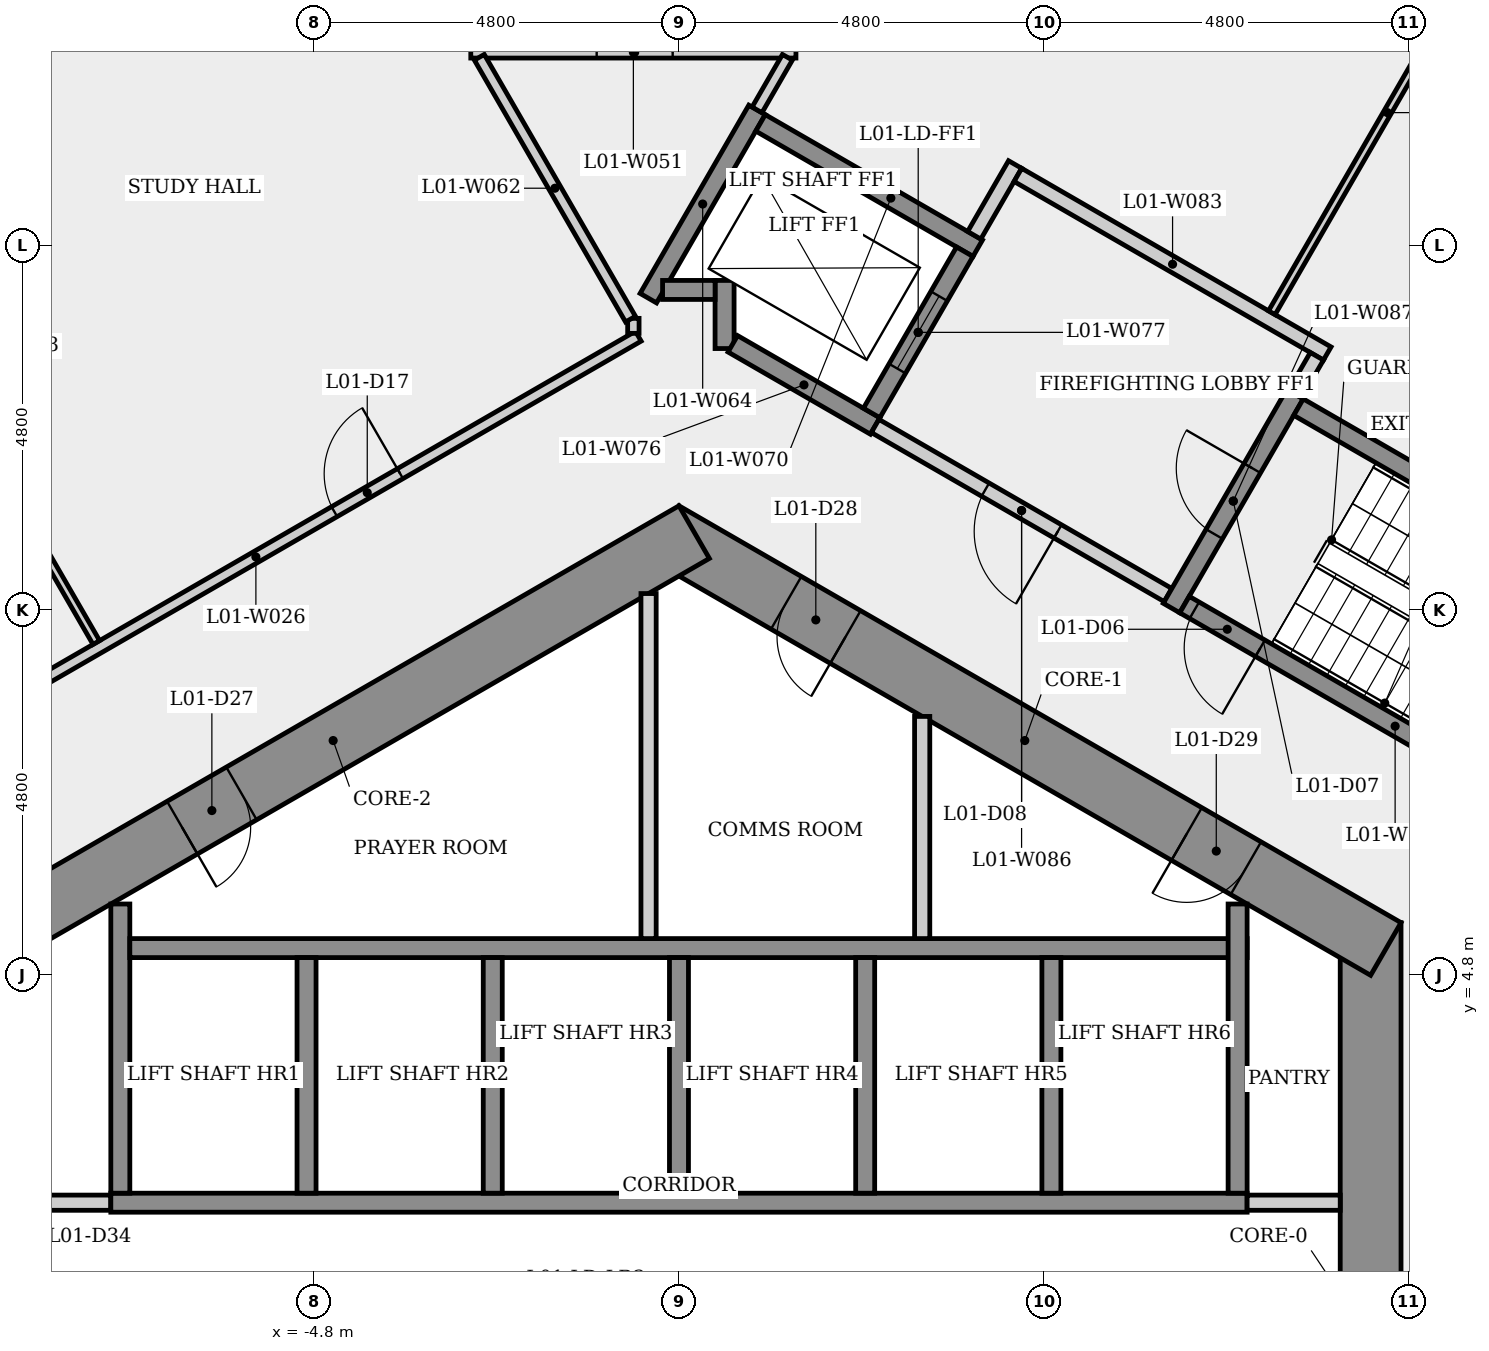
"""IFC4 building model, lengths in metres.
Left out: names, types, materials, properties, quantities, classifications, styles, units other than length and angle.
Written with IfcOpenShell. Run it as: python <this file> out.ifc"""

import sys

from ifc_helpers import new_model, si_unit, direction, frame, frame_2d, origin, place, context, subcontext, project, spatial, rectangle, extrude, element, fill, save


model = new_model("IFC4")
c1 = context("Model", 3, precision=1e-05, world=origin(), true_north=direction((0.0, 1.0)))
c2 = subcontext(c1, "Body", "Model", "MODEL_VIEW")
j1 = project(units=[si_unit("LENGTHUNIT", "METRE"), si_unit("PLANEANGLEUNIT", "RADIAN")], contexts=[c1])
p1 = place(None, origin())
s1 = spatial("IfcSite", under=j1, at=p1, CompositionType="ELEMENT")
p2 = place(p1, origin())
s2 = spatial("IfcBuilding", under=s1, at=p2, CompositionType="ELEMENT")
p3 = place(p2, frame((0.0, 0.0, 7.0)))
s3 = spatial("IfcBuildingStorey", under=s2, at=p3, CompositionType="ELEMENT", Elevation=7.0)
p4 = place(p3, frame((9.1, -5.485, 0.0), z_axis=(0.0, 0.0, 1.0), x_axis=(0.0, 1.0, 0.0)))
e1 = element("IfcWall", 1, at=p4, inside=s3, PredefinedType="SHEAR", context=c2, shape_type="SweptSolid", body=[
    extrude(rectangle(XDim=10.97, YDim=0.8, at=frame_2d((5.485, 0.0))), origin(), (0.0, 0.0, 1.0), 4.5),
])
p5 = place(p4, frame((4.685, 0.0, 0.0)))
e2 = element("IfcOpeningElement", 2, at=p5, cuts=e1, PredefinedType="OPENING", context=c2, shape_type="SweptSolid", body=[
    extrude(rectangle(XDim=1.6, YDim=2.1, at=frame_2d((0.8, 1.05))), frame((0.0, 0.41, 0.0), z_axis=(0.0, -1.0, 0.0), x_axis=(1.0, 0.0, 0.0)), (0.0, 0.0, 1.0), 0.82),
])
p6 = place(p3, frame((9.3, 5.138, 0.0), z_axis=(0.0, 0.0, 1.0), x_axis=(-0.866023993627, 0.500002442456, 0.0)))
e3 = element("IfcWall", 3, at=p6, inside=s3, PredefinedType="SHEAR", context=c2, shape_type="SweptSolid", body=[
    extrude(rectangle(XDim=10.97, YDim=0.8, at=frame_2d((5.485, 0.0))), origin(), (0.0, 0.0, 1.0), 4.5),
])
p7 = place(p6, frame((8.21, 0.0, 0.0)))
e4 = element("IfcOpeningElement", 4, at=p7, cuts=e3, PredefinedType="OPENING", context=c2, shape_type="SweptSolid", body=[
    extrude(rectangle(XDim=0.9, YDim=2.1, at=frame_2d((0.45, 1.05))), frame((0.0, 0.41, 0.0), z_axis=(0.0, -1.0, 0.0), x_axis=(1.0, 0.0, 0.0)), (0.0, 0.0, 1.0), 0.82),
])
p8 = place(p6, frame((2.126, 0.0, 0.0)))
e5 = element("IfcOpeningElement", 5, at=p8, cuts=e3, PredefinedType="OPENING", context=c2, shape_type="SweptSolid", body=[
    extrude(rectangle(XDim=0.9, YDim=2.1, at=frame_2d((0.45, 1.05))), frame((0.0, 0.41, 0.0), z_axis=(0.0, -1.0, 0.0), x_axis=(1.0, 0.0, 0.0)), (0.0, 0.0, 1.0), 0.82),
])
p9 = place(p3, frame((0.2, 10.623, 0.0), z_axis=(0.0, 0.0, 1.0), x_axis=(-0.866023993627, -0.500002442456, 0.0)))
e6 = element("IfcWall", 6, at=p9, inside=s3, PredefinedType="SHEAR", context=c2, shape_type="SweptSolid", body=[
    extrude(rectangle(XDim=10.97, YDim=0.8, at=frame_2d((5.485, 0.0))), origin(), (0.0, 0.0, 1.0), 4.5),
])
p10 = place(p9, frame((6.877, 0.0, 0.0)))
e7 = element("IfcOpeningElement", 7, at=p10, cuts=e6, PredefinedType="OPENING", context=c2, shape_type="SweptSolid", body=[
    extrude(rectangle(XDim=0.9, YDim=2.1, at=frame_2d((0.45, 1.05))), frame((0.0, 0.41, 0.0), z_axis=(0.0, -1.0, 0.0), x_axis=(1.0, 0.0, 0.0)), (0.0, 0.0, 1.0), 0.82),
])
p11 = place(p3, frame((-10.598, 7.391, 0.0), z_axis=(0.0, 0.0, 1.0), x_axis=(0.866022183431, 0.500005577774, 0.0)))
e8 = element("IfcWall", 8, at=p11, inside=s3, PredefinedType="PARTITIONING", context=c2, shape_type="SweptSolid", body=[
    extrude(rectangle(XDim=11.619, YDim=0.15, at=frame_2d((5.81, 0.0))), origin(), (0.0, 0.0, 1.0), 4.1),
])
p12 = place(p11, frame((7.001, 0.0, 0.0)))
e9 = element("IfcOpeningElement", 9, at=p12, cuts=e8, PredefinedType="OPENING", context=c2, shape_type="SweptSolid", body=[
    extrude(rectangle(XDim=1.0, YDim=2.1, at=frame_2d((0.5, 1.05))), frame((0.0, 0.085, 0.0), z_axis=(0.0, -1.0, 0.0), x_axis=(1.0, 0.0, 0.0)), (0.0, 0.0, 1.0), 0.17),
])
p13 = place(p3, frame((-8.7, 1.8, 0.0), z_axis=(0.0, 0.0, 1.0), x_axis=(1.0, 0.0, 0.0)))
e10 = element("IfcWall", 10, at=p13, inside=s3, PredefinedType="PARTITIONING", context=c2, shape_type="SweptSolid", body=[
    extrude(rectangle(XDim=1.225, YDim=0.2, at=frame_2d((0.613, 0.0))), origin(), (0.0, 0.0, 1.0), 4.1),
])
p14 = place(p3, frame((-7.666, 9.171, 0.0), z_axis=(0.0, 0.0, 1.0), x_axis=(-0.500009404554, 0.866019973994, 0.0)))
e11 = element("IfcWall", 11, at=p14, inside=s3, PredefinedType="PARTITIONING", context=c2, shape_type="SweptSolid", body=[
    extrude(rectangle(XDim=9.01, YDim=0.1, at=frame_2d((4.505, 0.0))), origin(), (0.0, 0.0, 1.0), 4.1),
])
p15 = place(p3, frame((-7.475, 1.8, 0.0), z_axis=(0.0, 0.0, 1.0), x_axis=(1.0, 0.0, 0.0)))
e12 = element("IfcWall", 12, at=p15, inside=s3, PredefinedType="SHEAR", context=c2, shape_type="SweptSolid", body=[
    extrude(rectangle(XDim=14.95, YDim=0.25, at=frame_2d((7.475, 0.0))), origin(), (0.0, 0.0, 1.0), 4.1),
])
p16 = place(p3, frame((-7.35, 1.925, 0.0), z_axis=(0.0, 0.0, 1.0), x_axis=(0.0, 1.0, 0.0)))
e13 = element("IfcWall", 13, at=p16, inside=s3, PredefinedType="SHEAR", context=c2, shape_type="SweptSolid", body=[
    extrude(rectangle(XDim=3.805, YDim=0.25, at=frame_2d((1.903, 0.0))), origin(), (0.0, 0.0, 1.0), 4.1),
])
p17 = place(p3, frame((-7.225, 5.15, 0.0), z_axis=(0.0, 0.0, 1.0), x_axis=(1.0, 0.0, 0.0)))
e14 = element("IfcWall", 14, at=p17, inside=s3, PredefinedType="SHEAR", context=c2, shape_type="SweptSolid", body=[
    extrude(rectangle(XDim=14.7, YDim=0.25, at=frame_2d((7.35, 0.0))), origin(), (0.0, 0.0, 1.0), 4.1),
])
p18 = place(p3, frame((-4.9, 5.025, 0.0), z_axis=(0.0, 0.0, 1.0), x_axis=(0.0, -1.0, 0.0)))
e15 = element("IfcWall", 15, at=p18, inside=s3, PredefinedType="SHEAR", context=c2, shape_type="SweptSolid", body=[
    extrude(rectangle(XDim=3.1, YDim=0.25, at=frame_2d((1.55, 0.0))), origin(), (0.0, 0.0, 1.0), 4.5),
])
p19 = place(p3, frame((-2.739, 16.936, 0.0), z_axis=(0.0, 0.0, 1.0), x_axis=(1.0, 0.0, 0.0)))
e16 = element("IfcWall", 16, at=p19, inside=s3, PredefinedType="PARTITIONING", context=c2, shape_type="SweptSolid", body=[
    extrude(rectangle(XDim=4.278, YDim=0.15, at=frame_2d((2.139, 0.0))), origin(), (0.0, 0.0, 1.0), 4.1),
])
p20 = place(p19, frame((1.656, 0.0, 0.0)))
e17 = element("IfcOpeningElement", 17, at=p20, cuts=e16, PredefinedType="OPENING", context=c2, shape_type="SweptSolid", body=[
    extrude(rectangle(XDim=1.0, YDim=2.1, at=frame_2d((0.5, 1.05))), frame((0.0, 0.085, 0.0), z_axis=(0.0, -1.0, 0.0), x_axis=(1.0, 0.0, 0.0)), (0.0, 0.0, 1.0), 0.17),
])
p21 = place(p3, frame((-2.45, 5.025, 0.0), z_axis=(0.0, 0.0, 1.0), x_axis=(0.0, -1.0, 0.0)))
e18 = element("IfcWall", 18, at=p21, inside=s3, PredefinedType="SHEAR", context=c2, shape_type="SweptSolid", body=[
    extrude(rectangle(XDim=3.1, YDim=0.25, at=frame_2d((1.55, 0.0))), origin(), (0.0, 0.0, 1.0), 4.5),
])
p22 = place(p3, frame((-0.6, 13.239, 0.0), z_axis=(0.0, 0.0, 1.0), x_axis=(0.0, 1.0, 0.0)))
e19 = element("IfcWall", 19, at=p22, inside=s3, PredefinedType="PARTITIONING", context=c2, shape_type="SweptSolid", body=[
    extrude(rectangle(XDim=0.197, YDim=0.15, at=frame_2d((0.099, 0.0))), origin(), (0.0, 0.0, 1.0), 4.1),
])
p23 = place(p3, frame((-0.637, 13.426, 0.0), z_axis=(0.0, 0.0, 1.0), x_axis=(-0.500046503579, 0.865998553266, 0.0)))
e20 = element("IfcWall", 20, at=p23, inside=s3, PredefinedType="PARTITIONING", context=c2, shape_type="SweptSolid", body=[
    extrude(rectangle(XDim=3.978, YDim=0.15, at=frame_2d((1.989, 0.0))), origin(), (0.0, 0.0, 1.0), 4.1),
])
p24 = place(p3, frame((-0.4, 9.815, 0.0), z_axis=(0.0, 0.0, 1.0), x_axis=(0.0, -1.0, 0.0)))
e21 = element("IfcWall", 21, at=p24, inside=s3, PredefinedType="PARTITIONING", context=c2, shape_type="SweptSolid", body=[
    extrude(rectangle(XDim=4.54, YDim=0.2, at=frame_2d((2.27, 0.0))), origin(), (0.0, 0.0, 1.0), 4.1),
])
p25 = place(p3, frame((-0.403, 13.702, 0.0), z_axis=(0.0, 0.0, 1.0), x_axis=(0.499976111731, 0.866039195244, 0.0)))
e22 = element("IfcWall", 22, at=p25, inside=s3, PredefinedType="SHEAR", context=c2, shape_type="SweptSolid", body=[
    extrude(rectangle(XDim=2.861, YDim=0.25, at=frame_2d((1.43, 0.0))), origin(), (0.0, 0.0, 1.0), 4.1),
])
p26 = place(p3, frame((0.0, 5.025, 0.0), z_axis=(0.0, 0.0, 1.0), x_axis=(0.0, -1.0, 0.0)))
e23 = element("IfcWall", 23, at=p26, inside=s3, PredefinedType="SHEAR", context=c2, shape_type="SweptSolid", body=[
    extrude(rectangle(XDim=3.1, YDim=0.25, at=frame_2d((1.55, 0.0))), origin(), (0.0, 0.0, 1.0), 4.5),
])
p27 = place(p3, frame((0.6, 13.039, 0.0), z_axis=(0.0, 0.0, 1.0), x_axis=(0.0, 1.0, 0.0)))
e24 = element("IfcWall", 24, at=p27, inside=s3, PredefinedType="SHEAR", context=c2, shape_type="SweptSolid", body=[
    extrude(rectangle(XDim=0.896, YDim=0.25, at=frame_2d((0.448, 0.0))), origin(), (0.0, 0.0, 1.0), 4.1),
])
p28 = place(p3, frame((0.475, 13.81, 0.0), z_axis=(0.0, 0.0, 1.0), x_axis=(-1.0, 0.0, 0.0)))
e25 = element("IfcWall", 25, at=p28, inside=s3, PredefinedType="SHEAR", context=c2, shape_type="SweptSolid", body=[
    extrude(rectangle(XDim=0.691, YDim=0.25, at=frame_2d((0.345, 0.0))), origin(), (0.0, 0.0, 1.0), 4.5),
])
p29 = place(p3, frame((1.073, 16.008, 0.0), z_axis=(0.0, 0.0, 1.0), x_axis=(0.866040211805, -0.499974350878, 0.0)))
e26 = element("IfcWall", 26, at=p29, inside=s3, PredefinedType="SHEAR", context=c2, shape_type="SweptSolid", body=[
    extrude(rectangle(XDim=3.3, YDim=0.25, at=frame_2d((1.65, 0.0))), origin(), (0.0, 0.0, 1.0), 4.1),
])
p30 = place(p3, frame((1.427, 16.871, 0.0), z_axis=(0.0, 0.0, 1.0), x_axis=(-0.499951716245, -0.866053278629, 0.0)))
e27 = element("IfcWall", 27, at=p30, inside=s3, PredefinedType="PARTITIONING", context=c2, shape_type="SweptSolid", body=[
    extrude(rectangle(XDim=0.799, YDim=0.15, at=frame_2d((0.399, 0.0))), origin(), (0.0, 0.0, 1.0), 4.1),
])
p31 = place(p3, frame((2.45, 5.025, 0.0), z_axis=(0.0, 0.0, 1.0), x_axis=(0.0, -1.0, 0.0)))
e28 = element("IfcWall", 28, at=p31, inside=s3, PredefinedType="SHEAR", context=c2, shape_type="SweptSolid", body=[
    extrude(rectangle(XDim=3.1, YDim=0.25, at=frame_2d((1.55, 0.0))), origin(), (0.0, 0.0, 1.0), 4.5),
])
p32 = place(p3, frame((2.581, 12.02, 0.0), z_axis=(0.0, 0.0, 1.0), x_axis=(-0.86603892542, 0.499976579108, 0.0)))
e29 = element("IfcWall", 29, at=p32, inside=s3, PredefinedType="SHEAR", context=c2, shape_type="SweptSolid", body=[
    extrude(rectangle(XDim=2.162, YDim=0.25, at=frame_2d((1.081, 0.0))), origin(), (0.0, 0.0, 1.0), 4.1),
])
p33 = place(p3, frame((2.535, 12.191, 0.0), z_axis=(0.0, 0.0, 1.0), x_axis=(0.500061746146, 0.865989751695, 0.0)))
e30 = element("IfcWall", 30, at=p33, inside=s3, PredefinedType="SHEAR", context=c2, shape_type="SweptSolid", body=[
    extrude(rectangle(XDim=2.45, YDim=0.25, at=frame_2d((1.225, 0.0))), origin(), (0.0, 0.0, 1.0), 4.5),
])
p34 = place(p33, frame((0.675, 0.0, 0.0)))
e31 = element("IfcOpeningElement", 31, at=p34, cuts=e30, PredefinedType="OPENING", context=c2, shape_type="SweptSolid", body=[
    extrude(rectangle(XDim=1.1, YDim=2.1, at=frame_2d((0.55, 1.05))), frame((0.0, 0.135, 0.0), z_axis=(0.0, -1.0, 0.0), x_axis=(1.0, 0.0, 0.0)), (0.0, 0.0, 1.0), 0.27),
])
p35 = place(p3, frame((3.2, 8.198, 0.0), z_axis=(0.0, 0.0, 1.0), x_axis=(0.0, -1.0, 0.0)))
e32 = element("IfcWall", 32, at=p35, inside=s3, PredefinedType="PARTITIONING", context=c2, shape_type="SweptSolid", body=[
    extrude(rectangle(XDim=2.924, YDim=0.2, at=frame_2d((1.462, 0.0))), origin(), (0.0, 0.0, 1.0), 4.1),
])
p36 = place(p3, frame((3.885, 14.529, 0.0), z_axis=(0.0, 0.0, 1.0), x_axis=(0.499997628298, 0.866026773083, 0.0)))
e33 = element("IfcWall", 33, at=p36, inside=s3, PredefinedType="PARTITIONING", context=c2, shape_type="SweptSolid", body=[
    extrude(rectangle(XDim=1.075, YDim=0.2, at=frame_2d((0.538, 0.0))), origin(), (0.0, 0.0, 1.0), 4.1),
])
p37 = place(p3, frame((4.459, 15.323, 0.0), z_axis=(0.0, 0.0, 1.0), x_axis=(0.866016039709, -0.500016218704, 0.0)))
e34 = element("IfcWall", 34, at=p37, inside=s3, PredefinedType="PARTITIONING", context=c2, shape_type="SweptSolid", body=[
    extrude(rectangle(XDim=4.7, YDim=0.2, at=frame_2d((2.35, 0.0))), origin(), (0.0, 0.0, 1.0), 4.1),
])
p38 = place(p3, frame((4.9, 5.025, 0.0), z_axis=(0.0, 0.0, 1.0), x_axis=(0.0, -1.0, 0.0)))
e35 = element("IfcWall", 35, at=p38, inside=s3, PredefinedType="SHEAR", context=c2, shape_type="SweptSolid", body=[
    extrude(rectangle(XDim=3.1, YDim=0.25, at=frame_2d((1.55, 0.0))), origin(), (0.0, 0.0, 1.0), 4.5),
])
p39 = place(p3, frame((6.435, 9.795, 0.0), z_axis=(0.0, 0.0, 1.0), x_axis=(-0.866012907634, 0.500021643343, 0.0)))
e36 = element("IfcWall", 36, at=p39, inside=s3, PredefinedType="PARTITIONING", context=c2, shape_type="SweptSolid", body=[
    extrude(rectangle(XDim=4.45, YDim=0.2, at=frame_2d((2.225, 0.0))), origin(), (0.0, 0.0, 1.0), 4.1),
])
p40 = place(p39, frame((1.675, 0.0, 0.0)))
e37 = element("IfcOpeningElement", 37, at=p40, cuts=e36, PredefinedType="OPENING", context=c2, shape_type="SweptSolid", body=[
    extrude(rectangle(XDim=1.1, YDim=2.1, at=frame_2d((0.55, 1.05))), frame((0.0, 0.11, 0.0), z_axis=(0.0, -1.0, 0.0), x_axis=(1.0, 0.0, 0.0)), (0.0, 0.0, 1.0), 0.22),
])
p41 = place(p3, frame((6.48, 9.624, 0.0), z_axis=(0.0, 0.0, 1.0), x_axis=(0.500017246033, 0.866015446554, 0.0)))
e38 = element("IfcWall", 38, at=p41, inside=s3, PredefinedType="SHEAR", context=c2, shape_type="SweptSolid", body=[
    extrude(rectangle(XDim=3.25, YDim=0.25, at=frame_2d((1.625, 0.0))), origin(), (0.0, 0.0, 1.0), 4.1),
])
p42 = place(p41, frame((1.125, 0.0, 0.0)))
e39 = element("IfcOpeningElement", 39, at=p42, cuts=e38, PredefinedType="OPENING", context=c2, shape_type="SweptSolid", body=[
    extrude(rectangle(XDim=1.0, YDim=2.1, at=frame_2d((0.5, 1.05))), frame((0.0, 0.135, 0.0), z_axis=(0.0, -1.0, 0.0), x_axis=(1.0, 0.0, 0.0)), (0.0, 0.0, 1.0), 0.27),
])
p43 = place(p3, frame((7.475, 1.8, 0.0), z_axis=(0.0, 0.0, 1.0), x_axis=(1.0, 0.0, 0.0)))
e40 = element("IfcWall", 40, at=p43, inside=s3, PredefinedType="PARTITIONING", context=c2, shape_type="SweptSolid", body=[
    extrude(rectangle(XDim=1.225, YDim=0.2, at=frame_2d((0.613, 0.0))), origin(), (0.0, 0.0, 1.0), 4.1),
])
p44 = place(p3, frame((7.35, 5.73, 0.0), z_axis=(0.0, 0.0, 1.0), x_axis=(0.0, -1.0, 0.0)))
e41 = element("IfcWall", 41, at=p44, inside=s3, PredefinedType="SHEAR", context=c2, shape_type="SweptSolid", body=[
    extrude(rectangle(XDim=3.805, YDim=0.25, at=frame_2d((1.903, 0.0))), origin(), (0.0, 0.0, 1.0), 4.1),
])
p45 = place(p3, frame((8.151, 12.268, 0.0), z_axis=(0.0, 0.0, 1.0), x_axis=(0.866025499775, -0.499999833739, 0.0)))
e42 = element("IfcWall", 42, at=p45, inside=s3, PredefinedType="SHEAR", context=c2, shape_type="SweptSolid", body=[
    extrude(rectangle(XDim=6.4, YDim=0.25, at=frame_2d((3.2, 0.0))), origin(), (0.0, 0.0, 1.0), 4.1),
])
p46 = place(p3, frame((8.393, 12.937, 0.0), z_axis=(0.0, 0.0, 1.0), x_axis=(-0.500065409566, -0.86598763626, 0.0)))
e43 = element("IfcWall", 43, at=p46, inside=s3, PredefinedType="PARTITIONING", context=c2, shape_type="SweptSolid", body=[
    extrude(rectangle(XDim=0.575, YDim=0.2, at=frame_2d((0.288, 0.0))), origin(), (0.0, 0.0, 1.0), 4.1),
])
p47 = place(p3, frame((10.84, 18.776, 0.0), z_axis=(0.0, 0.0, 1.0), x_axis=(-0.500003976293, -0.866023108059, 0.0)))
e44 = element("IfcWall", 44, at=p47, inside=s3, PredefinedType="PARTITIONING", context=c2, shape_type="SweptSolid", body=[
    extrude(rectangle(XDim=6.081, YDim=0.1, at=frame_2d((3.04, 0.0))), origin(), (0.0, 0.0, 1.0), 4.1),
])
p48 = place(p3, frame((12.194, 6.47, 0.0), z_axis=(0.0, 0.0, 1.0), x_axis=(-0.866025499775, 0.499999833739, 0.0)))
e45 = element("IfcWall", 45, at=p48, inside=s3, PredefinedType="SHEAR", context=c2, shape_type="SweptSolid", body=[
    extrude(rectangle(XDim=6.4, YDim=0.25, at=frame_2d((3.2, 0.0))), origin(), (0.0, 0.0, 1.0), 4.1),
])
p49 = place(p48, frame((5.25, 0.0, 0.0)))
e46 = element("IfcOpeningElement", 46, at=p49, cuts=e45, PredefinedType="OPENING", context=c2, shape_type="SweptSolid", body=[
    extrude(rectangle(XDim=1.0, YDim=2.1, at=frame_2d((0.5, 1.05))), frame((0.0, 0.135, 0.0), z_axis=(0.0, -1.0, 0.0), x_axis=(1.0, 0.0, 0.0)), (0.0, 0.0, 1.0), 0.27),
])
p50 = place(p49, origin())
e47 = element("IfcDoor", 47, at=p50, inside=s3, OperationType="SINGLE_SWING_LEFT", PredefinedType="DOOR", context=c2, shape_type="SweptSolid", body=[
    extrude(rectangle(XDim=1.0, YDim=2.1, at=frame_2d((0.5, 1.05))), frame((0.0, 0.025, 0.0), z_axis=(0.0, -1.0, 0.0), x_axis=(1.0, 0.0, 0.0)), (0.0, 0.0, 1.0), 0.05),
])
fill(e46, e47)
p51 = place(p42, origin())
e48 = element("IfcDoor", 48, at=p51, inside=s3, OperationType="SINGLE_SWING_RIGHT", PredefinedType="DOOR", context=c2, shape_type="SweptSolid", body=[
    extrude(rectangle(XDim=1.0, YDim=2.1, at=frame_2d((0.5, 1.05))), frame((0.0, 0.025, 0.0), z_axis=(0.0, -1.0, 0.0), x_axis=(1.0, 0.0, 0.0)), (0.0, 0.0, 1.0), 0.05),
])
fill(e39, e48)
p52 = place(p40, origin())
e49 = element("IfcDoor", 49, at=p52, inside=s3, OperationType="SINGLE_SWING_LEFT", PredefinedType="DOOR", context=c2, shape_type="SweptSolid", body=[
    extrude(rectangle(XDim=1.1, YDim=2.1, at=frame_2d((0.55, 1.05))), frame((0.0, 0.025, 0.0), z_axis=(0.0, -1.0, 0.0), x_axis=(1.0, 0.0, 0.0)), (0.0, 0.0, 1.0), 0.05),
])
fill(e37, e49)
p53 = place(p34, origin())
e50 = element("IfcDoor", 50, at=p53, inside=s3, OperationType="SLIDING_TO_LEFT", PredefinedType="DOOR", context=c2, shape_type="SweptSolid", body=[
    extrude(rectangle(XDim=1.1, YDim=2.1, at=frame_2d((0.55, 1.05))), frame((0.0, 0.025, 0.0), z_axis=(0.0, -1.0, 0.0), x_axis=(1.0, 0.0, 0.0)), (0.0, 0.0, 1.0), 0.05),
])
fill(e31, e50)
p54 = place(p12, origin())
e51 = element("IfcDoor", 51, at=p54, inside=s3, OperationType="SINGLE_SWING_RIGHT", PredefinedType="DOOR", context=c2, shape_type="SweptSolid", body=[
    extrude(rectangle(XDim=1.0, YDim=2.1, at=frame_2d((0.5, 1.05))), frame((0.0, 0.025, 0.0), z_axis=(0.0, -1.0, 0.0), x_axis=(1.0, 0.0, 0.0)), (0.0, 0.0, 1.0), 0.05),
])
fill(e9, e51)
p55 = place(p20, origin())
e52 = element("IfcDoor", 52, at=p55, inside=s3, OperationType="SINGLE_SWING_RIGHT", PredefinedType="DOOR", context=c2, shape_type="SweptSolid", body=[
    extrude(rectangle(XDim=1.0, YDim=2.1, at=frame_2d((0.5, 1.05))), frame((0.0, 0.025, 0.0), z_axis=(0.0, -1.0, 0.0), x_axis=(1.0, 0.0, 0.0)), (0.0, 0.0, 1.0), 0.05),
])
fill(e17, e52)
p56 = place(p10, origin())
e53 = element("IfcDoor", 53, at=p56, inside=s3, OperationType="SINGLE_SWING_RIGHT", PredefinedType="DOOR", context=c2, shape_type="SweptSolid", body=[
    extrude(rectangle(XDim=0.9, YDim=2.1, at=frame_2d((0.45, 1.05))), frame((0.0, 0.025, 0.0), z_axis=(0.0, -1.0, 0.0), x_axis=(1.0, 0.0, 0.0)), (0.0, 0.0, 1.0), 0.05),
])
fill(e7, e53)
p57 = place(p7, origin())
e54 = element("IfcDoor", 54, at=p57, inside=s3, OperationType="SINGLE_SWING_LEFT", PredefinedType="DOOR", context=c2, shape_type="SweptSolid", body=[
    extrude(rectangle(XDim=0.9, YDim=2.1, at=frame_2d((0.45, 1.05))), frame((0.0, 0.025, 0.0), z_axis=(0.0, -1.0, 0.0), x_axis=(1.0, 0.0, 0.0)), (0.0, 0.0, 1.0), 0.05),
])
fill(e4, e54)
p58 = place(p8, origin())
e55 = element("IfcDoor", 55, at=p58, inside=s3, OperationType="SINGLE_SWING_RIGHT", PredefinedType="DOOR", context=c2, shape_type="SweptSolid", body=[
    extrude(rectangle(XDim=0.9, YDim=2.1, at=frame_2d((0.45, 1.05))), frame((0.0, 0.025, 0.0), z_axis=(0.0, -1.0, 0.0), x_axis=(1.0, 0.0, 0.0)), (0.0, 0.0, 1.0), 0.05),
])
fill(e5, e55)
save(model, sys.argv[1])
